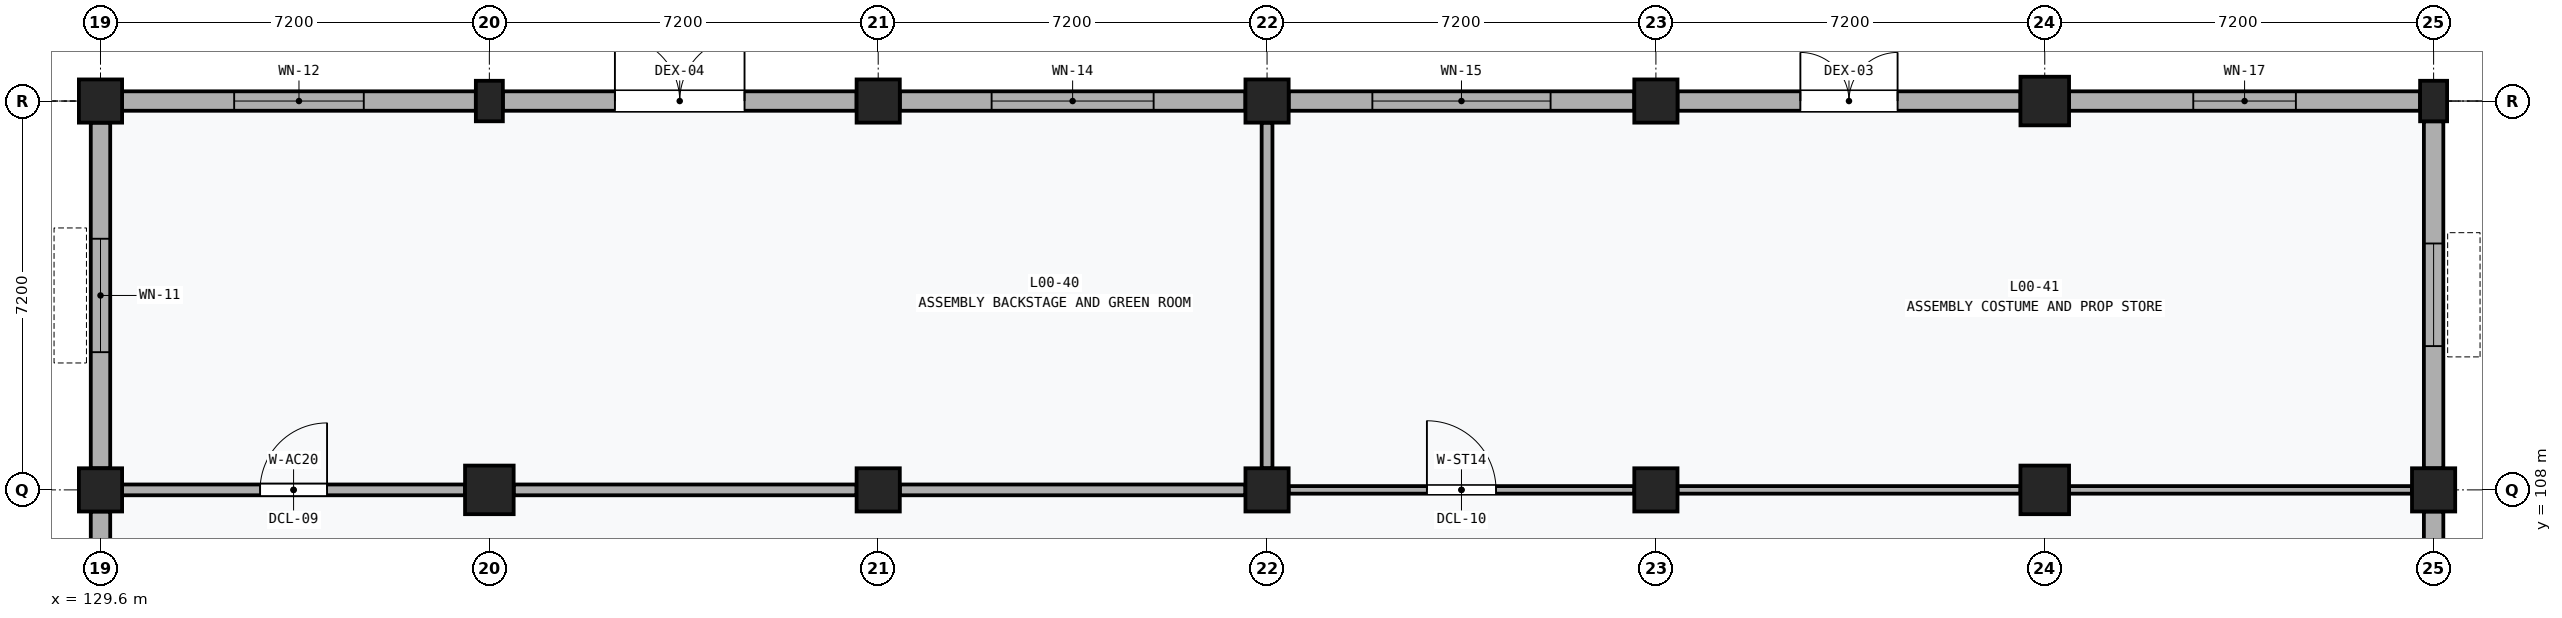
"""IFC4 building model, lengths in metres.
Left out: names, types, materials, properties, quantities, classifications, styles, units other than length and angle.
Written with IfcOpenShell. Run it as: python <this file> out.ifc"""

import sys

from ifc_helpers import new_model, si_unit, direction, frame, frame_2d, origin, origin_2d, place, context, subcontext, project, spatial, rectangle, extrude, element, fill, save


model = new_model("IFC4")
c1 = context("Model", 3, precision=1e-05, world=origin(), true_north=direction((0.0, 1.0)))
c2 = subcontext(c1, "Body", "Model", "MODEL_VIEW")
j1 = project(units=[si_unit("LENGTHUNIT", "METRE"), si_unit("PLANEANGLEUNIT", "RADIAN")], contexts=[c1])
p1 = place(None, origin())
s1 = spatial("IfcSite", under=j1, at=p1, CompositionType="ELEMENT")
p2 = place(p1, origin())
s2 = spatial("IfcBuilding", under=s1, at=p2, CompositionType="ELEMENT")
p3 = place(p2, origin())
s3 = spatial("IfcBuildingStorey", under=s2, at=p3, CompositionType="ELEMENT", Elevation=0.0)
for number, where, z_axis, x_axis in (
    (1, (129.6, 108.0, 0.0), (0.0, 0.0, 1.0), (1.0, 0.0, 0.0)),
    (2, (129.6, 115.2, 0.0), (0.0, 0.0, 1.0), (1.0, 0.0, 0.0)),
):
    element("IfcColumn", number, at=place(p3, frame(where, z_axis=z_axis, x_axis=x_axis)), inside=s3, PredefinedType="COLUMN", context=c2, shape_type="SweptSolid", body=[
        extrude(rectangle(XDim=0.8, YDim=0.8, at=origin_2d()), origin(), (0.0, 0.0, 1.0), 4.8),
    ])
p4 = place(p3, frame((136.8, 108.0, 0.0), z_axis=(0.0, 0.0, 1.0), x_axis=(1.0, 0.0, 0.0)))
e3 = element("IfcColumn", 3, at=p4, inside=s3, PredefinedType="COLUMN", context=c2, shape_type="SweptSolid", body=[
    extrude(rectangle(XDim=0.9, YDim=0.9, at=origin_2d()), origin(), (0.0, 0.0, 1.0), 4.8),
])
p5 = place(p3, frame((136.8, 115.2, 0.0), z_axis=(0.0, 0.0, 1.0), x_axis=(1.0, 0.0, 0.0)))
e4 = element("IfcColumn", 4, at=p5, inside=s3, PredefinedType="PILASTER", context=c2, shape_type="SweptSolid", body=[
    extrude(rectangle(XDim=0.5, YDim=0.75, at=origin_2d()), origin(), (0.0, 0.0, 1.0), 4.8),
])
for number, where, z_axis, x_axis in (
    (5, (144.0, 108.0, 0.0), (0.0, 0.0, 1.0), (1.0, 0.0, 0.0)),
    (6, (144.0, 115.2, 0.0), (0.0, 0.0, 1.0), (1.0, 0.0, 0.0)),
    (7, (151.2, 108.0, 0.0), (0.0, 0.0, 1.0), (1.0, 0.0, 0.0)),
    (8, (151.2, 115.2, 0.0), (0.0, 0.0, 1.0), (1.0, 0.0, 0.0)),
    (9, (158.4, 108.0, 0.0), (0.0, 0.0, 1.0), (1.0, 0.0, 0.0)),
    (10, (158.4, 115.2, 0.0), (0.0, 0.0, 1.0), (1.0, 0.0, 0.0)),
):
    element("IfcColumn", number, at=place(p3, frame(where, z_axis=z_axis, x_axis=x_axis)), inside=s3, PredefinedType="COLUMN", context=c2, shape_type="SweptSolid", body=[
        extrude(rectangle(XDim=0.8, YDim=0.8, at=origin_2d()), origin(), (0.0, 0.0, 1.0), 4.8),
    ])
for number, where, z_axis, x_axis in (
    (11, (165.6, 108.0, 0.0), (0.0, 0.0, 1.0), (1.0, 0.0, 0.0)),
    (12, (165.6, 115.2, 0.0), (0.0, 0.0, 1.0), (1.0, 0.0, 0.0)),
):
    element("IfcColumn", number, at=place(p3, frame(where, z_axis=z_axis, x_axis=x_axis)), inside=s3, PredefinedType="COLUMN", context=c2, shape_type="SweptSolid", body=[
        extrude(rectangle(XDim=0.9, YDim=0.9, at=origin_2d()), origin(), (0.0, 0.0, 1.0), 4.8),
    ])
p6 = place(p3, frame((172.8, 108.0, 0.0), z_axis=(0.0, 0.0, 1.0), x_axis=(1.0, 0.0, 0.0)))
e13 = element("IfcColumn", 13, at=p6, inside=s3, PredefinedType="COLUMN", context=c2, shape_type="SweptSolid", body=[
    extrude(rectangle(XDim=0.8, YDim=0.8, at=origin_2d()), origin(), (0.0, 0.0, 1.0), 4.8),
])
p7 = place(p3, frame((172.8, 115.2, 0.0), z_axis=(0.0, 0.0, 1.0), x_axis=(1.0, 0.0, 0.0)))
e14 = element("IfcColumn", 14, at=p7, inside=s3, PredefinedType="PILASTER", context=c2, shape_type="SweptSolid", body=[
    extrude(rectangle(XDim=0.5, YDim=0.75, at=origin_2d()), origin(), (0.0, 0.0, 1.0), 4.8),
])
p8 = place(p3, frame((129.6, 101.2, 0.0), z_axis=(0.0, 0.0, 1.0), x_axis=(0.0, 1.0, 0.0)))
e15 = element("IfcWall", 15, at=p8, inside=s3, PredefinedType="SOLIDWALL", context=c2, shape_type="SweptSolid", body=[
    extrude(rectangle(XDim=6.4, YDim=0.36, at=frame_2d((3.2, 0.0))), origin(), (0.0, 0.0, 1.0), 3.89),
])
p9 = place(p8, frame((2.3, 0.0, 0.85)))
e16 = element("IfcOpeningElement", 16, at=p9, cuts=e15, PredefinedType="OPENING", context=c2, shape_type="SweptSolid", body=[
    extrude(rectangle(XDim=1.8, YDim=2.0, at=frame_2d((0.9, 1.0))), frame((0.0, 0.192, 0.0), z_axis=(0.0, -1.0, 0.0), x_axis=(1.0, 0.0, 0.0)), (0.0, 0.0, 1.0), 0.384),
])
p10 = place(p3, frame((130.0, 115.2, 0.0), z_axis=(0.0, 0.0, 1.0), x_axis=(1.0, 0.0, 0.0)))
e17 = element("IfcWall", 17, at=p10, inside=s3, PredefinedType="SOLIDWALL", context=c2, shape_type="SweptSolid", body=[
    extrude(rectangle(XDim=6.55, YDim=0.36, at=frame_2d((3.275, 0.0))), origin(), (0.0, 0.0, 1.0), 3.89),
])
p11 = place(p10, frame((2.075, 0.0, 0.85)))
e18 = element("IfcOpeningElement", 18, at=p11, cuts=e17, PredefinedType="OPENING", context=c2, shape_type="SweptSolid", body=[
    extrude(rectangle(XDim=2.4, YDim=2.0, at=frame_2d((1.2, 1.0))), frame((0.0, 0.192, 0.0), z_axis=(0.0, -1.0, 0.0), x_axis=(1.0, 0.0, 0.0)), (0.0, 0.0, 1.0), 0.384),
])
p12 = place(p3, frame((129.6, 108.4, 0.0), z_axis=(0.0, 0.0, 1.0), x_axis=(0.0, 1.0, 0.0)))
e19 = element("IfcWall", 19, at=p12, inside=s3, PredefinedType="SOLIDWALL", context=c2, shape_type="SweptSolid", body=[
    extrude(rectangle(XDim=6.4, YDim=0.36, at=frame_2d((3.2, 0.0))), origin(), (0.0, 0.0, 1.0), 3.89),
])
p13 = place(p12, frame((2.15, 0.0, 0.85)))
e20 = element("IfcOpeningElement", 20, at=p13, cuts=e19, PredefinedType="OPENING", context=c2, shape_type="SweptSolid", body=[
    extrude(rectangle(XDim=2.1, YDim=2.0, at=frame_2d((1.05, 1.0))), frame((0.0, 0.192, 0.0), z_axis=(0.0, -1.0, 0.0), x_axis=(1.0, 0.0, 0.0)), (0.0, 0.0, 1.0), 0.384),
])
p14 = place(p3, frame((137.05, 115.2, 0.0), z_axis=(0.0, 0.0, 1.0), x_axis=(1.0, 0.0, 0.0)))
e21 = element("IfcWall", 21, at=p14, inside=s3, PredefinedType="SOLIDWALL", context=c2, shape_type="SweptSolid", body=[
    extrude(rectangle(XDim=6.55, YDim=0.36, at=frame_2d((3.275, 0.0))), origin(), (0.0, 0.0, 1.0), 3.89),
])
p15 = place(p14, frame((2.075, 0.0, 0.0)))
e22 = element("IfcOpeningElement", 22, at=p15, cuts=e21, PredefinedType="OPENING", context=c2, shape_type="SweptSolid", body=[
    extrude(rectangle(XDim=2.4, YDim=2.45, at=frame_2d((1.2, 1.225))), frame((0.0, 0.192, 0.0), z_axis=(0.0, -1.0, 0.0), x_axis=(1.0, 0.0, 0.0)), (0.0, 0.0, 1.0), 0.384),
])
p16 = place(p3, frame((144.4, 115.2, 0.0), z_axis=(0.0, 0.0, 1.0), x_axis=(1.0, 0.0, 0.0)))
e23 = element("IfcWall", 23, at=p16, inside=s3, PredefinedType="SOLIDWALL", context=c2, shape_type="SweptSolid", body=[
    extrude(rectangle(XDim=6.4, YDim=0.36, at=frame_2d((3.2, 0.0))), origin(), (0.0, 0.0, 1.0), 3.89),
])
p17 = place(p16, frame((1.7, 0.0, 0.85)))
e24 = element("IfcOpeningElement", 24, at=p17, cuts=e23, PredefinedType="OPENING", context=c2, shape_type="SweptSolid", body=[
    extrude(rectangle(XDim=3.0, YDim=2.0, at=frame_2d((1.5, 1.0))), frame((0.0, 0.192, 0.0), z_axis=(0.0, -1.0, 0.0), x_axis=(1.0, 0.0, 0.0)), (0.0, 0.0, 1.0), 0.384),
])
p18 = place(p3, frame((151.6, 115.2, 0.0), z_axis=(0.0, 0.0, 1.0), x_axis=(1.0, 0.0, 0.0)))
e25 = element("IfcWall", 25, at=p18, inside=s3, PredefinedType="SOLIDWALL", context=c2, shape_type="SweptSolid", body=[
    extrude(rectangle(XDim=6.4, YDim=0.36, at=frame_2d((3.2, 0.0))), origin(), (0.0, 0.0, 1.0), 3.89),
])
p19 = place(p18, frame((1.55, 0.0, 0.85)))
e26 = element("IfcOpeningElement", 26, at=p19, cuts=e25, PredefinedType="OPENING", context=c2, shape_type="SweptSolid", body=[
    extrude(rectangle(XDim=3.3, YDim=2.0, at=frame_2d((1.65, 1.0))), frame((0.0, 0.192, 0.0), z_axis=(0.0, -1.0, 0.0), x_axis=(1.0, 0.0, 0.0)), (0.0, 0.0, 1.0), 0.384),
])
p20 = place(p3, frame((158.8, 115.2, 0.0), z_axis=(0.0, 0.0, 1.0), x_axis=(1.0, 0.0, 0.0)))
e27 = element("IfcWall", 27, at=p20, inside=s3, PredefinedType="SOLIDWALL", context=c2, shape_type="SweptSolid", body=[
    extrude(rectangle(XDim=6.35, YDim=0.36, at=frame_2d((3.175, 0.0))), origin(), (0.0, 0.0, 1.0), 3.89),
])
p21 = place(p20, frame((2.275, 0.0, 0.0)))
e28 = element("IfcOpeningElement", 28, at=p21, cuts=e27, PredefinedType="OPENING", context=c2, shape_type="SweptSolid", body=[
    extrude(rectangle(XDim=1.8, YDim=2.35, at=frame_2d((0.9, 1.175))), frame((0.0, 0.192, 0.0), z_axis=(0.0, -1.0, 0.0), x_axis=(1.0, 0.0, 0.0)), (0.0, 0.0, 1.0), 0.384),
])
p22 = place(p3, frame((172.8, 101.2, 0.0), z_axis=(0.0, 0.0, 1.0), x_axis=(0.0, 1.0, 0.0)))
e29 = element("IfcWall", 29, at=p22, inside=s3, PredefinedType="SOLIDWALL", context=c2, shape_type="SweptSolid", body=[
    extrude(rectangle(XDim=6.4, YDim=0.36, at=frame_2d((3.2, 0.0))), origin(), (0.0, 0.0, 1.0), 3.89),
])
p23 = place(p22, frame((2.4, 0.0, 1.1)))
e30 = element("IfcOpeningElement", 30, at=p23, cuts=e29, PredefinedType="OPENING", context=c2, shape_type="SweptSolid", body=[
    extrude(rectangle(XDim=1.6, YDim=1.5, at=frame_2d((0.8, 0.75))), frame((0.0, 0.192, 0.0), z_axis=(0.0, -1.0, 0.0), x_axis=(1.0, 0.0, 0.0)), (0.0, 0.0, 1.0), 0.384),
])
p24 = place(p3, frame((166.05, 115.2, 0.0), z_axis=(0.0, 0.0, 1.0), x_axis=(1.0, 0.0, 0.0)))
e31 = element("IfcWall", 31, at=p24, inside=s3, PredefinedType="SOLIDWALL", context=c2, shape_type="SweptSolid", body=[
    extrude(rectangle(XDim=6.5, YDim=0.36, at=frame_2d((3.25, 0.0))), origin(), (0.0, 0.0, 1.0), 3.89),
])
p25 = place(p24, frame((2.3, 0.0, 1.1)))
e32 = element("IfcOpeningElement", 32, at=p25, cuts=e31, PredefinedType="OPENING", context=c2, shape_type="SweptSolid", body=[
    extrude(rectangle(XDim=1.9, YDim=1.5, at=frame_2d((0.95, 0.75))), frame((0.0, 0.192, 0.0), z_axis=(0.0, -1.0, 0.0), x_axis=(1.0, 0.0, 0.0)), (0.0, 0.0, 1.0), 0.384),
])
p26 = place(p3, frame((172.8, 108.4, 0.0), z_axis=(0.0, 0.0, 1.0), x_axis=(0.0, 1.0, 0.0)))
e33 = element("IfcWall", 33, at=p26, inside=s3, PredefinedType="SOLIDWALL", context=c2, shape_type="SweptSolid", body=[
    extrude(rectangle(XDim=6.425, YDim=0.36, at=frame_2d((3.212, 0.0))), origin(), (0.0, 0.0, 1.0), 3.89),
])
p27 = place(p26, frame((2.262, 0.0, 1.1)))
e34 = element("IfcOpeningElement", 34, at=p27, cuts=e33, PredefinedType="OPENING", context=c2, shape_type="SweptSolid", body=[
    extrude(rectangle(XDim=1.9, YDim=1.5, at=frame_2d((0.95, 0.75))), frame((0.0, 0.192, 0.0), z_axis=(0.0, -1.0, 0.0), x_axis=(1.0, 0.0, 0.0)), (0.0, 0.0, 1.0), 0.384),
])
p28 = place(p3, frame((130.0, 108.0, 0.0), z_axis=(0.0, 0.0, 1.0), x_axis=(1.0, 0.0, 0.0)))
e35 = element("IfcWall", 35, at=p28, inside=s3, PredefinedType="PARTITIONING", context=c2, shape_type="SweptSolid", body=[
    extrude(rectangle(XDim=6.35, YDim=0.2, at=frame_2d((3.175, 0.0))), origin(), (0.0, 0.0, 1.0), 3.62),
])
p29 = place(p28, frame((2.555, 0.0, 0.0)))
e36 = element("IfcOpeningElement", 36, at=p29, cuts=e35, PredefinedType="OPENING", context=c2, shape_type="SweptSolid", body=[
    extrude(rectangle(XDim=1.24, YDim=2.26, at=frame_2d((0.62, 1.13))), frame((0.0, 0.112, 0.0), z_axis=(0.0, -1.0, 0.0), x_axis=(1.0, 0.0, 0.0)), (0.0, 0.0, 1.0), 0.224),
])
p30 = place(p3, frame((137.25, 108.0, 0.0), z_axis=(0.0, 0.0, 1.0), x_axis=(1.0, 0.0, 0.0)))
e37 = element("IfcWall", 37, at=p30, inside=s3, PredefinedType="PARTITIONING", context=c2, shape_type="SweptSolid", body=[
    extrude(rectangle(XDim=6.35, YDim=0.2, at=frame_2d((3.175, 0.0))), origin(), (0.0, 0.0, 1.0), 3.62),
])
for number, where, z_axis, x_axis in (
    (38, (144.4, 108.0, 0.0), (0.0, 0.0, 1.0), (1.0, 0.0, 0.0)),
    (39, (151.2, 108.4, 0.0), (0.0, 0.0, 1.0), (0.0, 1.0, 0.0)),
):
    element("IfcWall", number, at=place(p3, frame(where, z_axis=z_axis, x_axis=x_axis)), inside=s3, PredefinedType="PARTITIONING", context=c2, shape_type="SweptSolid", body=[
        extrude(rectangle(XDim=6.4, YDim=0.2, at=frame_2d((3.2, 0.0))), origin(), (0.0, 0.0, 1.0), 3.62),
    ])
p31 = place(p3, frame((151.6, 108.0, 0.0), z_axis=(0.0, 0.0, 1.0), x_axis=(1.0, 0.0, 0.0)))
e40 = element("IfcWall", 40, at=p31, inside=s3, PredefinedType="PARTITIONING", context=c2, shape_type="SweptSolid", body=[
    extrude(rectangle(XDim=6.4, YDim=0.14, at=frame_2d((3.2, 0.0))), origin(), (0.0, 0.0, 1.0), 3.62),
])
p32 = place(p31, frame((2.56, 0.0, 0.0)))
e41 = element("IfcOpeningElement", 41, at=p32, cuts=e40, PredefinedType="OPENING", context=c2, shape_type="SweptSolid", body=[
    extrude(rectangle(XDim=1.28, YDim=2.28, at=frame_2d((0.64, 1.14))), frame((0.0, 0.082, 0.0), z_axis=(0.0, -1.0, 0.0), x_axis=(1.0, 0.0, 0.0)), (0.0, 0.0, 1.0), 0.164),
])
for number, where, z_axis, x_axis in (
    (42, (158.8, 108.0, 0.0), (0.0, 0.0, 1.0), (1.0, 0.0, 0.0)),
    (43, (166.05, 108.0, 0.0), (0.0, 0.0, 1.0), (1.0, 0.0, 0.0)),
):
    element("IfcWall", number, at=place(p3, frame(where, z_axis=z_axis, x_axis=x_axis)), inside=s3, PredefinedType="PARTITIONING", context=c2, shape_type="SweptSolid", body=[
        extrude(rectangle(XDim=6.35, YDim=0.14, at=frame_2d((3.175, 0.0))), origin(), (0.0, 0.0, 1.0), 3.62),
    ])
p33 = place(p11, origin())
e44 = element("IfcWindow", 44, at=p33, inside=s3, PartitioningType="SINGLE_PANEL", PredefinedType="WINDOW", context=c2, shape_type="SweptSolid", body=[
    extrude(rectangle(XDim=2.4, YDim=2.0, at=frame_2d((1.2, 1.0))), frame((0.0, 0.03, 0.0), z_axis=(0.0, -1.0, 0.0), x_axis=(1.0, 0.0, 0.0)), (0.0, 0.0, 1.0), 0.06),
])
fill(e18, e44)
p34 = place(p13, origin())
e45 = element("IfcWindow", 45, at=p34, inside=s3, PartitioningType="SINGLE_PANEL", PredefinedType="WINDOW", context=c2, shape_type="SweptSolid", body=[
    extrude(rectangle(XDim=2.1, YDim=2.0, at=frame_2d((1.05, 1.0))), frame((0.0, 0.03, 0.0), z_axis=(0.0, -1.0, 0.0), x_axis=(1.0, 0.0, 0.0)), (0.0, 0.0, 1.0), 0.06),
])
fill(e20, e45)
p35 = place(p15, origin())
e46 = element("IfcDoor", 46, at=p35, inside=s3, OperationType="DOUBLE_DOOR_SINGLE_SWING", PredefinedType="DOOR", context=c2, shape_type="SweptSolid", body=[
    extrude(rectangle(XDim=2.4, YDim=2.45, at=frame_2d((1.2, 1.225))), frame((0.0, 0.025, 0.0), z_axis=(0.0, -1.0, 0.0), x_axis=(1.0, 0.0, 0.0)), (0.0, 0.0, 1.0), 0.05),
])
fill(e22, e46)
p36 = place(p17, origin())
e47 = element("IfcWindow", 47, at=p36, inside=s3, PartitioningType="SINGLE_PANEL", PredefinedType="WINDOW", context=c2, shape_type="SweptSolid", body=[
    extrude(rectangle(XDim=3.0, YDim=2.0, at=frame_2d((1.5, 1.0))), frame((0.0, 0.03, 0.0), z_axis=(0.0, -1.0, 0.0), x_axis=(1.0, 0.0, 0.0)), (0.0, 0.0, 1.0), 0.06),
])
fill(e24, e47)
p37 = place(p19, origin())
e48 = element("IfcWindow", 48, at=p37, inside=s3, PartitioningType="SINGLE_PANEL", PredefinedType="WINDOW", context=c2, shape_type="SweptSolid", body=[
    extrude(rectangle(XDim=3.3, YDim=2.0, at=frame_2d((1.65, 1.0))), frame((0.0, 0.03, 0.0), z_axis=(0.0, -1.0, 0.0), x_axis=(1.0, 0.0, 0.0)), (0.0, 0.0, 1.0), 0.06),
])
fill(e26, e48)
p38 = place(p21, origin())
e49 = element("IfcDoor", 49, at=p38, inside=s3, OperationType="DOUBLE_DOOR_SINGLE_SWING", PredefinedType="DOOR", context=c2, shape_type="SweptSolid", body=[
    extrude(rectangle(XDim=1.8, YDim=2.35, at=frame_2d((0.9, 1.175))), frame((0.0, 0.025, 0.0), z_axis=(0.0, -1.0, 0.0), x_axis=(1.0, 0.0, 0.0)), (0.0, 0.0, 1.0), 0.05),
])
fill(e28, e49)
p39 = place(p25, origin())
e50 = element("IfcWindow", 50, at=p39, inside=s3, PartitioningType="SINGLE_PANEL", PredefinedType="WINDOW", context=c2, shape_type="SweptSolid", body=[
    extrude(rectangle(XDim=1.9, YDim=1.5, at=frame_2d((0.95, 0.75))), frame((0.0, 0.03, 0.0), z_axis=(0.0, -1.0, 0.0), x_axis=(1.0, 0.0, 0.0)), (0.0, 0.0, 1.0), 0.06),
])
fill(e32, e50)
p40 = place(p27, origin())
e51 = element("IfcWindow", 51, at=p40, inside=s3, PartitioningType="SINGLE_PANEL", PredefinedType="WINDOW", context=c2, shape_type="SweptSolid", body=[
    extrude(rectangle(XDim=1.9, YDim=1.5, at=frame_2d((0.95, 0.75))), frame((0.0, 0.03, 0.0), z_axis=(0.0, -1.0, 0.0), x_axis=(1.0, 0.0, 0.0)), (0.0, 0.0, 1.0), 0.06),
])
fill(e34, e51)
p41 = place(p29, origin())
e52 = element("IfcDoor", 52, at=p41, inside=s3, OperationType="SINGLE_SWING_RIGHT", PredefinedType="DOOR", context=c2, shape_type="SweptSolid", body=[
    extrude(rectangle(XDim=1.24, YDim=2.26, at=frame_2d((0.62, 1.13))), frame((0.0, 0.025, 0.0), z_axis=(0.0, -1.0, 0.0), x_axis=(1.0, 0.0, 0.0)), (0.0, 0.0, 1.0), 0.05),
])
fill(e36, e52)
p42 = place(p32, origin())
e53 = element("IfcDoor", 53, at=p42, inside=s3, OperationType="SINGLE_SWING_LEFT", PredefinedType="DOOR", context=c2, shape_type="SweptSolid", body=[
    extrude(rectangle(XDim=1.28, YDim=2.28, at=frame_2d((0.64, 1.14))), frame((0.0, 0.025, 0.0), z_axis=(0.0, -1.0, 0.0), x_axis=(1.0, 0.0, 0.0)), (0.0, 0.0, 1.0), 0.05),
])
fill(e41, e53)
save(model, sys.argv[1])
